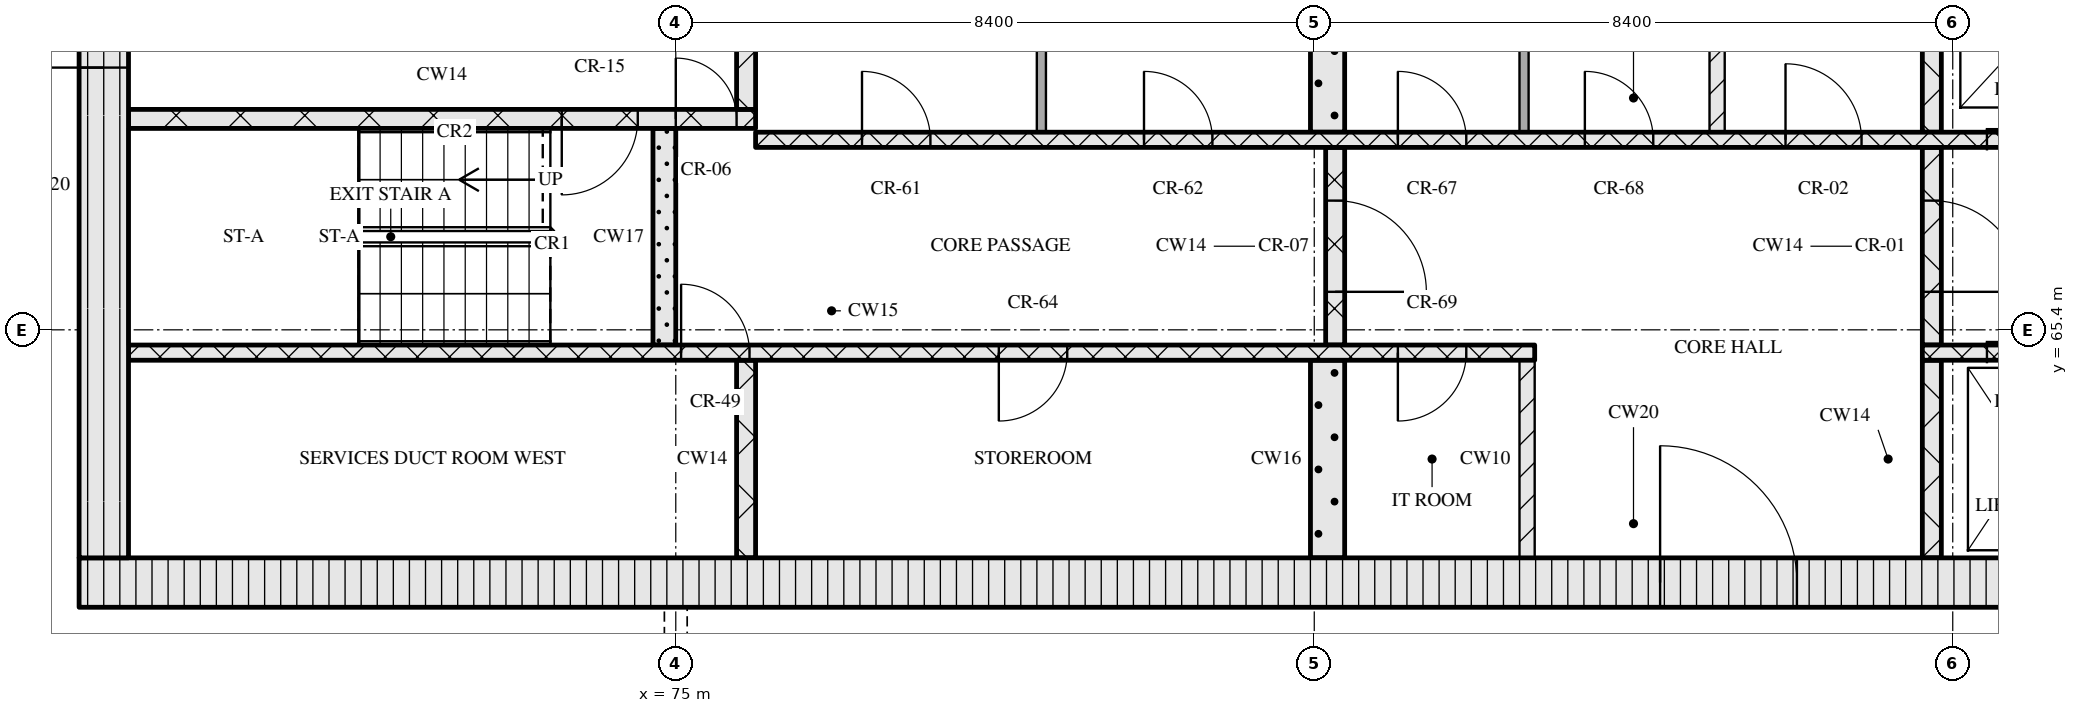
"""IFC4 building model, lengths in metres.
Left out: names, types, materials, properties, quantities, classifications, styles, units other than length and angle.
Written with IfcOpenShell. Run it as: python <this file> out.ifc"""

import sys

from ifc_helpers import new_model, si_unit, direction, frame, frame_2d, origin, place, context, subcontext, project, spatial, rectangle, extrude, element, fill, save


model = new_model("IFC4")
c1 = context("Model", 3, precision=1e-05, world=origin(), true_north=direction((0.0, 1.0)))
c2 = subcontext(c1, "Body", "Model", "MODEL_VIEW")
j1 = project(units=[si_unit("LENGTHUNIT", "METRE"), si_unit("PLANEANGLEUNIT", "RADIAN")], contexts=[c1])
p1 = place(None, origin())
s1 = spatial("IfcSite", under=j1, at=p1, CompositionType="ELEMENT")
p2 = place(p1, origin())
s2 = spatial("IfcBuilding", under=s1, at=p2, CompositionType="ELEMENT")
p3 = place(p2, frame((0.0, 0.0, 205.5)))
s3 = spatial("IfcBuildingStorey", under=s2, at=p3, CompositionType="ELEMENT", Elevation=205.5)
p4 = place(p3, frame((67.15, 62.075, 0.0), z_axis=(0.0, 0.0, 1.0), x_axis=(1.0, 0.0, 0.0)))
e1 = element("IfcWall", 1, at=p4, inside=s3, PredefinedType="SOLIDWALL", context=c2, shape_type="SweptSolid", body=[
    extrude(rectangle(XDim=40.9, YDim=0.65, at=frame_2d((20.45, 0.0))), origin(), (0.0, 0.0, 1.0), 3.32),
])
p5 = place(p4, frame((20.8, 0.0, 0.0)))
e2 = element("IfcOpeningElement", 2, at=p5, cuts=e1, PredefinedType="OPENING", context=c2, shape_type="SweptSolid", body=[
    extrude(rectangle(XDim=1.8, YDim=2.1, at=frame_2d((0.9, 1.05))), frame((0.0, 0.335, 0.0), z_axis=(0.0, -1.0, 0.0), x_axis=(1.0, 0.0, 0.0)), (0.0, 0.0, 1.0), 0.67),
])
p6 = place(p3, frame((67.475, 62.4, 0.0), z_axis=(0.0, 0.0, 1.0), x_axis=(0.0, 1.0, 0.0)))
e3 = element("IfcWall", 3, at=p6, inside=s3, PredefinedType="SOLIDWALL", context=c2, shape_type="SweptSolid", body=[
    extrude(rectangle(XDim=12.0, YDim=0.65, at=frame_2d((6.0, 0.0))), origin(), (0.0, 0.0, 1.0), 3.32),
])
p7 = place(p6, frame((6.45, 0.0, 0.0)))
e4 = element("IfcOpeningElement", 4, at=p7, cuts=e3, PredefinedType="OPENING", context=c2, shape_type="SweptSolid", body=[
    extrude(rectangle(XDim=1.2, YDim=2.1, at=frame_2d((0.6, 1.05))), frame((0.0, 0.335, 0.0), z_axis=(0.0, -1.0, 0.0), x_axis=(1.0, 0.0, 0.0)), (0.0, 0.0, 1.0), 0.67),
])
p8 = place(p3, frame((75.925, 62.4, 0.0), z_axis=(0.0, 0.0, 1.0), x_axis=(0.0, 1.0, 0.0)))
e5 = element("IfcWall", 5, at=p8, inside=s3, PredefinedType="SOLIDWALL", context=c2, shape_type="SweptSolid", body=[
    extrude(rectangle(XDim=2.6, YDim=0.25, at=frame_2d((1.3, 0.0))), origin(), (0.0, 0.0, 1.0), 3.32),
])
p9 = place(p3, frame((83.575, 62.4, 0.0), z_axis=(0.0, 0.0, 1.0), x_axis=(0.0, 1.0, 0.0)))
e6 = element("IfcWall", 6, at=p9, inside=s3, PredefinedType="SOLIDWALL", context=c2, shape_type="SweptSolid", body=[
    extrude(rectangle(XDim=2.6, YDim=0.45, at=frame_2d((1.3, 0.0))), origin(), (0.0, 0.0, 1.0), 3.32),
])
p10 = place(p3, frame((86.2, 62.4, 0.0), z_axis=(0.0, 0.0, 1.0), x_axis=(0.0, 1.0, 0.0)))
e7 = element("IfcWall", 7, at=p10, inside=s3, PredefinedType="PARTITIONING", context=c2, shape_type="SweptSolid", body=[
    extrude(rectangle(XDim=2.6, YDim=0.2, at=frame_2d((1.3, 0.0))), origin(), (0.0, 0.0, 1.0), 3.32),
])
p11 = place(p3, frame((91.525, 62.4, 0.0), z_axis=(0.0, 0.0, 1.0), x_axis=(0.0, 1.0, 0.0)))
e8 = element("IfcWall", 8, at=p11, inside=s3, PredefinedType="SOLIDWALL", context=c2, shape_type="SweptSolid", body=[
    extrude(rectangle(XDim=2.6, YDim=0.25, at=frame_2d((1.3, 0.0))), origin(), (0.0, 0.0, 1.0), 3.32),
])
p12 = place(p3, frame((67.8, 65.1, 0.0), z_axis=(0.0, 0.0, 1.0), x_axis=(1.0, 0.0, 0.0)))
e9 = element("IfcWall", 9, at=p12, inside=s3, PredefinedType="SOLIDWALL", context=c2, shape_type="SweptSolid", body=[
    extrude(rectangle(XDim=18.5, YDim=0.2, at=frame_2d((9.25, 0.0))), origin(), (0.0, 0.0, 1.0), 3.32),
])
p13 = place(p12, frame((7.27, 0.0, 0.0)))
e10 = element("IfcOpeningElement", 10, at=p13, cuts=e9, PredefinedType="OPENING", context=c2, shape_type="SweptSolid", body=[
    extrude(rectangle(XDim=0.9, YDim=2.1, at=frame_2d((0.45, 1.05))), frame((0.0, 0.11, 0.0), z_axis=(0.0, -1.0, 0.0), x_axis=(1.0, 0.0, 0.0)), (0.0, 0.0, 1.0), 0.22),
])
p14 = place(p12, frame((11.45, 0.0, 0.0)))
e11 = element("IfcOpeningElement", 11, at=p14, cuts=e9, PredefinedType="OPENING", context=c2, shape_type="SweptSolid", body=[
    extrude(rectangle(XDim=0.9, YDim=2.1, at=frame_2d((0.45, 1.05))), frame((0.0, 0.11, 0.0), z_axis=(0.0, -1.0, 0.0), x_axis=(1.0, 0.0, 0.0)), (0.0, 0.0, 1.0), 0.22),
])
p15 = place(p12, frame((16.7, 0.0, 0.0)))
e12 = element("IfcOpeningElement", 12, at=p15, cuts=e9, PredefinedType="OPENING", context=c2, shape_type="SweptSolid", body=[
    extrude(rectangle(XDim=0.9, YDim=2.1, at=frame_2d((0.45, 1.05))), frame((0.0, 0.11, 0.0), z_axis=(0.0, -1.0, 0.0), x_axis=(1.0, 0.0, 0.0)), (0.0, 0.0, 1.0), 0.22),
])
p16 = place(p3, frame((91.4, 65.1, 0.0), z_axis=(0.0, 0.0, 1.0), x_axis=(1.0, 0.0, 0.0)))
e13 = element("IfcWall", 13, at=p16, inside=s3, PredefinedType="SOLIDWALL", context=c2, shape_type="SweptSolid", body=[
    extrude(rectangle(XDim=16.0, YDim=0.2, at=frame_2d((8.0, 0.0))), origin(), (0.0, 0.0, 1.0), 3.32),
])
p17 = place(p16, frame((0.85, 0.0, 0.0)))
e14 = element("IfcOpeningElement", 14, at=p17, cuts=e13, PredefinedType="OPENING", context=c2, shape_type="SweptSolid", body=[
    extrude(rectangle(XDim=1.1, YDim=2.1, at=frame_2d((0.55, 1.05))), frame((0.0, 0.11, 0.0), z_axis=(0.0, -1.0, 0.0), x_axis=(1.0, 0.0, 0.0)), (0.0, 0.0, 1.0), 0.22),
])
p18 = place(p16, frame((3.35, 0.0, 0.0)))
e15 = element("IfcOpeningElement", 15, at=p18, cuts=e13, PredefinedType="OPENING", context=c2, shape_type="SweptSolid", body=[
    extrude(rectangle(XDim=1.1, YDim=2.1, at=frame_2d((0.55, 1.05))), frame((0.0, 0.11, 0.0), z_axis=(0.0, -1.0, 0.0), x_axis=(1.0, 0.0, 0.0)), (0.0, 0.0, 1.0), 0.22),
])
p19 = place(p16, frame((5.85, 0.0, 0.0)))
e16 = element("IfcOpeningElement", 16, at=p19, cuts=e13, PredefinedType="OPENING", context=c2, shape_type="SweptSolid", body=[
    extrude(rectangle(XDim=1.1, YDim=2.1, at=frame_2d((0.55, 1.05))), frame((0.0, 0.11, 0.0), z_axis=(0.0, -1.0, 0.0), x_axis=(1.0, 0.0, 0.0)), (0.0, 0.0, 1.0), 0.22),
])
p20 = place(p16, frame((7.83, 0.0, 0.0)))
e17 = element("IfcOpeningElement", 17, at=p20, cuts=e13, PredefinedType="OPENING", context=c2, shape_type="SweptSolid", body=[
    extrude(rectangle(XDim=0.9, YDim=2.1, at=frame_2d((0.45, 1.05))), frame((0.0, 0.11, 0.0), z_axis=(0.0, -1.0, 0.0), x_axis=(1.0, 0.0, 0.0)), (0.0, 0.0, 1.0), 0.22),
])
p21 = place(p3, frame((74.85, 65.2, 0.0), z_axis=(0.0, 0.0, 1.0), x_axis=(0.0, 1.0, 0.0)))
e18 = element("IfcWall", 18, at=p21, inside=s3, PredefinedType="SOLIDWALL", context=c2, shape_type="SweptSolid", body=[
    extrude(rectangle(XDim=2.85, YDim=0.3, at=frame_2d((1.425, 0.0))), origin(), (0.0, 0.0, 1.0), 3.32),
])
p22 = place(p3, frame((83.675, 65.2, 0.0), z_axis=(0.0, 0.0, 1.0), x_axis=(0.0, 1.0, 0.0)))
e19 = element("IfcWall", 19, at=p22, inside=s3, PredefinedType="SOLIDWALL", context=c2, shape_type="SweptSolid", body=[
    extrude(rectangle(XDim=2.6, YDim=0.25, at=frame_2d((1.3, 0.0))), origin(), (0.0, 0.0, 1.0), 3.32),
])
p23 = place(p22, frame((0.7, 0.0, 0.0)))
e20 = element("IfcOpeningElement", 20, at=p23, cuts=e19, PredefinedType="OPENING", context=c2, shape_type="SweptSolid", body=[
    extrude(rectangle(XDim=1.2, YDim=2.1, at=frame_2d((0.6, 1.05))), frame((0.0, 0.135, 0.0), z_axis=(0.0, -1.0, 0.0), x_axis=(1.0, 0.0, 0.0)), (0.0, 0.0, 1.0), 0.27),
])
p24 = place(p3, frame((91.525, 65.2, 0.0), z_axis=(0.0, 0.0, 1.0), x_axis=(0.0, 1.0, 0.0)))
e21 = element("IfcWall", 21, at=p24, inside=s3, PredefinedType="SOLIDWALL", context=c2, shape_type="SweptSolid", body=[
    extrude(rectangle(XDim=2.6, YDim=0.25, at=frame_2d((1.3, 0.0))), origin(), (0.0, 0.0, 1.0), 3.32),
])
p25 = place(p24, frame((0.7, 0.0, 0.0)))
e22 = element("IfcOpeningElement", 22, at=p25, cuts=e21, PredefinedType="OPENING", context=c2, shape_type="SweptSolid", body=[
    extrude(rectangle(XDim=1.2, YDim=2.1, at=frame_2d((0.6, 1.05))), frame((0.0, 0.135, 0.0), z_axis=(0.0, -1.0, 0.0), x_axis=(1.0, 0.0, 0.0)), (0.0, 0.0, 1.0), 0.27),
])
p26 = place(p3, frame((76.05, 67.9, 0.0), z_axis=(0.0, 0.0, 1.0), x_axis=(1.0, 0.0, 0.0)))
e23 = element("IfcWall", 23, at=p26, inside=s3, PredefinedType="SOLIDWALL", context=c2, shape_type="SweptSolid", body=[
    extrude(rectangle(XDim=23.1, YDim=0.2, at=frame_2d((11.55, 0.0))), origin(), (0.0, 0.0, 1.0), 3.32),
])
p27 = place(p26, frame((1.4, 0.0, 0.0)))
e24 = element("IfcOpeningElement", 24, at=p27, cuts=e23, PredefinedType="OPENING", context=c2, shape_type="SweptSolid", body=[
    extrude(rectangle(XDim=0.9, YDim=2.1, at=frame_2d((0.45, 1.05))), frame((0.0, 0.11, 0.0), z_axis=(0.0, -1.0, 0.0), x_axis=(1.0, 0.0, 0.0)), (0.0, 0.0, 1.0), 0.22),
])
p28 = place(p26, frame((5.11, 0.0, 0.0)))
e25 = element("IfcOpeningElement", 25, at=p28, cuts=e23, PredefinedType="OPENING", context=c2, shape_type="SweptSolid", body=[
    extrude(rectangle(XDim=0.9, YDim=2.1, at=frame_2d((0.45, 1.05))), frame((0.0, 0.11, 0.0), z_axis=(0.0, -1.0, 0.0), x_axis=(1.0, 0.0, 0.0)), (0.0, 0.0, 1.0), 0.22),
])
p29 = place(p26, frame((8.45, 0.0, 0.0)))
e26 = element("IfcOpeningElement", 26, at=p29, cuts=e23, PredefinedType="OPENING", context=c2, shape_type="SweptSolid", body=[
    extrude(rectangle(XDim=0.9, YDim=2.1, at=frame_2d((0.45, 1.05))), frame((0.0, 0.11, 0.0), z_axis=(0.0, -1.0, 0.0), x_axis=(1.0, 0.0, 0.0)), (0.0, 0.0, 1.0), 0.22),
])
p30 = place(p26, frame((10.91, 0.0, 0.0)))
e27 = element("IfcOpeningElement", 27, at=p30, cuts=e23, PredefinedType="OPENING", context=c2, shape_type="SweptSolid", body=[
    extrude(rectangle(XDim=0.9, YDim=2.1, at=frame_2d((0.45, 1.05))), frame((0.0, 0.11, 0.0), z_axis=(0.0, -1.0, 0.0), x_axis=(1.0, 0.0, 0.0)), (0.0, 0.0, 1.0), 0.22),
])
p31 = place(p26, frame((13.55, 0.0, 0.0)))
e28 = element("IfcOpeningElement", 28, at=p31, cuts=e23, PredefinedType="OPENING", context=c2, shape_type="SweptSolid", body=[
    extrude(rectangle(XDim=1.0, YDim=2.1, at=frame_2d((0.5, 1.05))), frame((0.0, 0.11, 0.0), z_axis=(0.0, -1.0, 0.0), x_axis=(1.0, 0.0, 0.0)), (0.0, 0.0, 1.0), 0.22),
])
p32 = place(p26, frame((16.2, 0.0, 0.0)))
e29 = element("IfcOpeningElement", 29, at=p32, cuts=e23, PredefinedType="OPENING", context=c2, shape_type="SweptSolid", body=[
    extrude(rectangle(XDim=1.1, YDim=2.1, at=frame_2d((0.55, 1.05))), frame((0.0, 0.11, 0.0), z_axis=(0.0, -1.0, 0.0), x_axis=(1.0, 0.0, 0.0)), (0.0, 0.0, 1.0), 0.22),
])
p33 = place(p26, frame((18.7, 0.0, 0.0)))
e30 = element("IfcOpeningElement", 30, at=p33, cuts=e23, PredefinedType="OPENING", context=c2, shape_type="SweptSolid", body=[
    extrude(rectangle(XDim=1.1, YDim=2.1, at=frame_2d((0.55, 1.05))), frame((0.0, 0.11, 0.0), z_axis=(0.0, -1.0, 0.0), x_axis=(1.0, 0.0, 0.0)), (0.0, 0.0, 1.0), 0.22),
])
p34 = place(p26, frame((21.2, 0.0, 0.0)))
e31 = element("IfcOpeningElement", 31, at=p34, cuts=e23, PredefinedType="OPENING", context=c2, shape_type="SweptSolid", body=[
    extrude(rectangle(XDim=1.1, YDim=2.1, at=frame_2d((0.55, 1.05))), frame((0.0, 0.11, 0.0), z_axis=(0.0, -1.0, 0.0), x_axis=(1.0, 0.0, 0.0)), (0.0, 0.0, 1.0), 0.22),
])
p35 = place(p3, frame((79.81, 68.0, 0.0), z_axis=(0.0, 0.0, 1.0), x_axis=(0.0, 1.0, 0.0)))
e32 = element("IfcWall", 32, at=p35, inside=s3, PredefinedType="PARTITIONING", context=c2, shape_type="SweptSolid", body=[
    extrude(rectangle(XDim=2.6, YDim=0.12, at=frame_2d((1.3, 0.0))), origin(), (0.0, 0.0, 1.0), 3.32),
])
p36 = place(p3, frame((83.575, 68.0, 0.0), z_axis=(0.0, 0.0, 1.0), x_axis=(0.0, 1.0, 0.0)))
e33 = element("IfcWall", 33, at=p36, inside=s3, PredefinedType="SOLIDWALL", context=c2, shape_type="SweptSolid", body=[
    extrude(rectangle(XDim=2.6, YDim=0.45, at=frame_2d((1.3, 0.0))), origin(), (0.0, 0.0, 1.0), 3.32),
])
p37 = place(p3, frame((86.16, 68.0, 0.0), z_axis=(0.0, 0.0, 1.0), x_axis=(0.0, 1.0, 0.0)))
e34 = element("IfcWall", 34, at=p37, inside=s3, PredefinedType="PARTITIONING", context=c2, shape_type="SweptSolid", body=[
    extrude(rectangle(XDim=2.6, YDim=0.12, at=frame_2d((1.3, 0.0))), origin(), (0.0, 0.0, 1.0), 3.32),
])
p38 = place(p3, frame((88.7, 68.0, 0.0), z_axis=(0.0, 0.0, 1.0), x_axis=(0.0, 1.0, 0.0)))
e35 = element("IfcWall", 35, at=p38, inside=s3, PredefinedType="PARTITIONING", context=c2, shape_type="SweptSolid", body=[
    extrude(rectangle(XDim=2.6, YDim=0.2, at=frame_2d((1.3, 0.0))), origin(), (0.0, 0.0, 1.0), 3.32),
])
p39 = place(p3, frame((91.525, 68.0, 0.0), z_axis=(0.0, 0.0, 1.0), x_axis=(0.0, 1.0, 0.0)))
e36 = element("IfcWall", 36, at=p39, inside=s3, PredefinedType="SOLIDWALL", context=c2, shape_type="SweptSolid", body=[
    extrude(rectangle(XDim=2.6, YDim=0.25, at=frame_2d((1.3, 0.0))), origin(), (0.0, 0.0, 1.0), 3.32),
])
p40 = place(p3, frame((67.8, 68.175, 0.0), z_axis=(0.0, 0.0, 1.0), x_axis=(1.0, 0.0, 0.0)))
e37 = element("IfcWall", 37, at=p40, inside=s3, PredefinedType="SOLIDWALL", context=c2, shape_type="SweptSolid", body=[
    extrude(rectangle(XDim=8.25, YDim=0.25, at=frame_2d((4.125, 0.0))), origin(), (0.0, 0.0, 1.0), 3.32),
])
p41 = place(p40, frame((5.7, 0.0, 0.0)))
e38 = element("IfcOpeningElement", 38, at=p41, cuts=e37, PredefinedType="OPENING", context=c2, shape_type="SweptSolid", body=[
    extrude(rectangle(XDim=1.0, YDim=2.1, at=frame_2d((0.5, 1.05))), frame((0.0, 0.135, 0.0), z_axis=(0.0, -1.0, 0.0), x_axis=(1.0, 0.0, 0.0)), (0.0, 0.0, 1.0), 0.27),
])
p42 = place(p40, frame((7.2, 0.0, 0.0)))
e39 = element("IfcOpeningElement", 39, at=p42, cuts=e37, PredefinedType="OPENING", context=c2, shape_type="SweptSolid", body=[
    extrude(rectangle(XDim=0.8, YDim=2.1, at=frame_2d((0.4, 1.05))), frame((0.0, 0.135, 0.0), z_axis=(0.0, -1.0, 0.0), x_axis=(1.0, 0.0, 0.0)), (0.0, 0.0, 1.0), 0.27),
])
p43 = place(p3, frame((75.925, 68.3, 0.0), z_axis=(0.0, 0.0, 1.0), x_axis=(0.0, 1.0, 0.0)))
e40 = element("IfcWall", 40, at=p43, inside=s3, PredefinedType="SOLIDWALL", context=c2, shape_type="SweptSolid", body=[
    extrude(rectangle(XDim=2.3, YDim=0.25, at=frame_2d((1.15, 0.0))), origin(), (0.0, 0.0, 1.0), 3.32),
])
p44 = place(p5, origin())
e41 = element("IfcDoor", 41, at=p44, inside=s3, OperationType="DOUBLE_DOOR_SINGLE_SWING", PredefinedType="DOOR", context=c2, shape_type="SweptSolid", body=[
    extrude(rectangle(XDim=1.8, YDim=2.1, at=frame_2d((0.9, 1.05))), frame((0.0, 0.025, 0.0), z_axis=(0.0, -1.0, 0.0), x_axis=(1.0, 0.0, 0.0)), (0.0, 0.0, 1.0), 0.05),
])
fill(e2, e41)
p45 = place(p13, origin())
e42 = element("IfcDoor", 42, at=p45, inside=s3, OperationType="SINGLE_SWING_LEFT", PredefinedType="DOOR", context=c2, shape_type="SweptSolid", body=[
    extrude(rectangle(XDim=0.9, YDim=2.1, at=frame_2d((0.45, 1.05))), frame((0.0, 0.025, 0.0), z_axis=(0.0, -1.0, 0.0), x_axis=(1.0, 0.0, 0.0)), (0.0, 0.0, 1.0), 0.05),
])
fill(e10, e42)
p46 = place(p14, origin())
e43 = element("IfcDoor", 43, at=p46, inside=s3, OperationType="SINGLE_SWING_RIGHT", PredefinedType="DOOR", context=c2, shape_type="SweptSolid", body=[
    extrude(rectangle(XDim=0.9, YDim=2.1, at=frame_2d((0.45, 1.05))), frame((0.0, 0.025, 0.0), z_axis=(0.0, -1.0, 0.0), x_axis=(1.0, 0.0, 0.0)), (0.0, 0.0, 1.0), 0.05),
])
fill(e11, e43)
p47 = place(p15, origin())
e44 = element("IfcDoor", 44, at=p47, inside=s3, OperationType="SINGLE_SWING_RIGHT", PredefinedType="DOOR", context=c2, shape_type="SweptSolid", body=[
    extrude(rectangle(XDim=0.9, YDim=2.1, at=frame_2d((0.45, 1.05))), frame((0.0, 0.025, 0.0), z_axis=(0.0, -1.0, 0.0), x_axis=(1.0, 0.0, 0.0)), (0.0, 0.0, 1.0), 0.05),
])
fill(e12, e44)
p48 = place(p17, origin())
e45 = element("IfcDoor", 45, at=p48, inside=s3, OperationType="SLIDING_TO_LEFT", PredefinedType="DOOR", context=c2, shape_type="SweptSolid", body=[
    extrude(rectangle(XDim=1.1, YDim=2.1, at=frame_2d((0.55, 1.05))), frame((0.0, 0.025, 0.0), z_axis=(0.0, -1.0, 0.0), x_axis=(1.0, 0.0, 0.0)), (0.0, 0.0, 1.0), 0.05),
])
fill(e14, e45)
p49 = place(p23, origin())
e46 = element("IfcDoor", 46, at=p49, inside=s3, OperationType="SINGLE_SWING_RIGHT", PredefinedType="DOOR", context=c2, shape_type="SweptSolid", body=[
    extrude(rectangle(XDim=1.2, YDim=2.1, at=frame_2d((0.6, 1.05))), frame((0.0, 0.025, 0.0), z_axis=(0.0, -1.0, 0.0), x_axis=(1.0, 0.0, 0.0)), (0.0, 0.0, 1.0), 0.05),
])
fill(e20, e46)
p50 = place(p25, origin())
e47 = element("IfcDoor", 47, at=p50, inside=s3, OperationType="SINGLE_SWING_RIGHT", PredefinedType="DOOR", context=c2, shape_type="SweptSolid", body=[
    extrude(rectangle(XDim=1.2, YDim=2.1, at=frame_2d((0.6, 1.05))), frame((0.0, 0.025, 0.0), z_axis=(0.0, -1.0, 0.0), x_axis=(1.0, 0.0, 0.0)), (0.0, 0.0, 1.0), 0.05),
])
fill(e22, e47)
p51 = place(p27, origin())
e48 = element("IfcDoor", 48, at=p51, inside=s3, OperationType="SINGLE_SWING_LEFT", PredefinedType="DOOR", context=c2, shape_type="SweptSolid", body=[
    extrude(rectangle(XDim=0.9, YDim=2.1, at=frame_2d((0.45, 1.05))), frame((0.0, 0.025, 0.0), z_axis=(0.0, -1.0, 0.0), x_axis=(1.0, 0.0, 0.0)), (0.0, 0.0, 1.0), 0.05),
])
fill(e24, e48)
p52 = place(p28, origin())
e49 = element("IfcDoor", 49, at=p52, inside=s3, OperationType="SINGLE_SWING_LEFT", PredefinedType="DOOR", context=c2, shape_type="SweptSolid", body=[
    extrude(rectangle(XDim=0.9, YDim=2.1, at=frame_2d((0.45, 1.05))), frame((0.0, 0.025, 0.0), z_axis=(0.0, -1.0, 0.0), x_axis=(1.0, 0.0, 0.0)), (0.0, 0.0, 1.0), 0.05),
])
fill(e25, e49)
p53 = place(p29, origin())
e50 = element("IfcDoor", 50, at=p53, inside=s3, OperationType="SINGLE_SWING_LEFT", PredefinedType="DOOR", context=c2, shape_type="SweptSolid", body=[
    extrude(rectangle(XDim=0.9, YDim=2.1, at=frame_2d((0.45, 1.05))), frame((0.0, 0.025, 0.0), z_axis=(0.0, -1.0, 0.0), x_axis=(1.0, 0.0, 0.0)), (0.0, 0.0, 1.0), 0.05),
])
fill(e26, e50)
p54 = place(p30, origin())
e51 = element("IfcDoor", 51, at=p54, inside=s3, OperationType="SINGLE_SWING_LEFT", PredefinedType="DOOR", context=c2, shape_type="SweptSolid", body=[
    extrude(rectangle(XDim=0.9, YDim=2.1, at=frame_2d((0.45, 1.05))), frame((0.0, 0.025, 0.0), z_axis=(0.0, -1.0, 0.0), x_axis=(1.0, 0.0, 0.0)), (0.0, 0.0, 1.0), 0.05),
])
fill(e27, e51)
p55 = place(p31, origin())
e52 = element("IfcDoor", 52, at=p55, inside=s3, OperationType="SINGLE_SWING_LEFT", PredefinedType="DOOR", context=c2, shape_type="SweptSolid", body=[
    extrude(rectangle(XDim=1.0, YDim=2.1, at=frame_2d((0.5, 1.05))), frame((0.0, 0.025, 0.0), z_axis=(0.0, -1.0, 0.0), x_axis=(1.0, 0.0, 0.0)), (0.0, 0.0, 1.0), 0.05),
])
fill(e28, e52)
p56 = place(p32, origin())
e53 = element("IfcDoor", 53, at=p56, inside=s3, OperationType="SLIDING_TO_RIGHT", PredefinedType="DOOR", context=c2, shape_type="SweptSolid", body=[
    extrude(rectangle(XDim=1.1, YDim=2.1, at=frame_2d((0.55, 1.05))), frame((0.0, 0.025, 0.0), z_axis=(0.0, -1.0, 0.0), x_axis=(1.0, 0.0, 0.0)), (0.0, 0.0, 1.0), 0.05),
])
fill(e29, e53)
p57 = place(p41, origin())
e54 = element("IfcDoor", 54, at=p57, inside=s3, OperationType="SINGLE_SWING_RIGHT", PredefinedType="DOOR", context=c2, shape_type="SweptSolid", body=[
    extrude(rectangle(XDim=1.0, YDim=2.1, at=frame_2d((0.5, 1.05))), frame((0.0, 0.025, 0.0), z_axis=(0.0, -1.0, 0.0), x_axis=(1.0, 0.0, 0.0)), (0.0, 0.0, 1.0), 0.05),
])
fill(e38, e54)
p58 = place(p42, origin())
e55 = element("IfcDoor", 55, at=p58, inside=s3, OperationType="SINGLE_SWING_LEFT", PredefinedType="DOOR", context=c2, shape_type="SweptSolid", body=[
    extrude(rectangle(XDim=0.8, YDim=2.1, at=frame_2d((0.4, 1.05))), frame((0.0, 0.025, 0.0), z_axis=(0.0, -1.0, 0.0), x_axis=(1.0, 0.0, 0.0)), (0.0, 0.0, 1.0), 0.05),
])
fill(e39, e55)
p59 = place(p7, origin())
e56 = element("IfcDoor", 56, at=p59, inside=s3, OperationType="SINGLE_SWING_LEFT", PredefinedType="DOOR", context=c2, shape_type="SweptSolid", body=[
    extrude(rectangle(XDim=1.2, YDim=2.1, at=frame_2d((0.6, 1.05))), frame((0.0, 0.025, 0.0), z_axis=(0.0, -1.0, 0.0), x_axis=(1.0, 0.0, 0.0)), (0.0, 0.0, 1.0), 0.05),
])
fill(e4, e56)
save(model, sys.argv[1])
